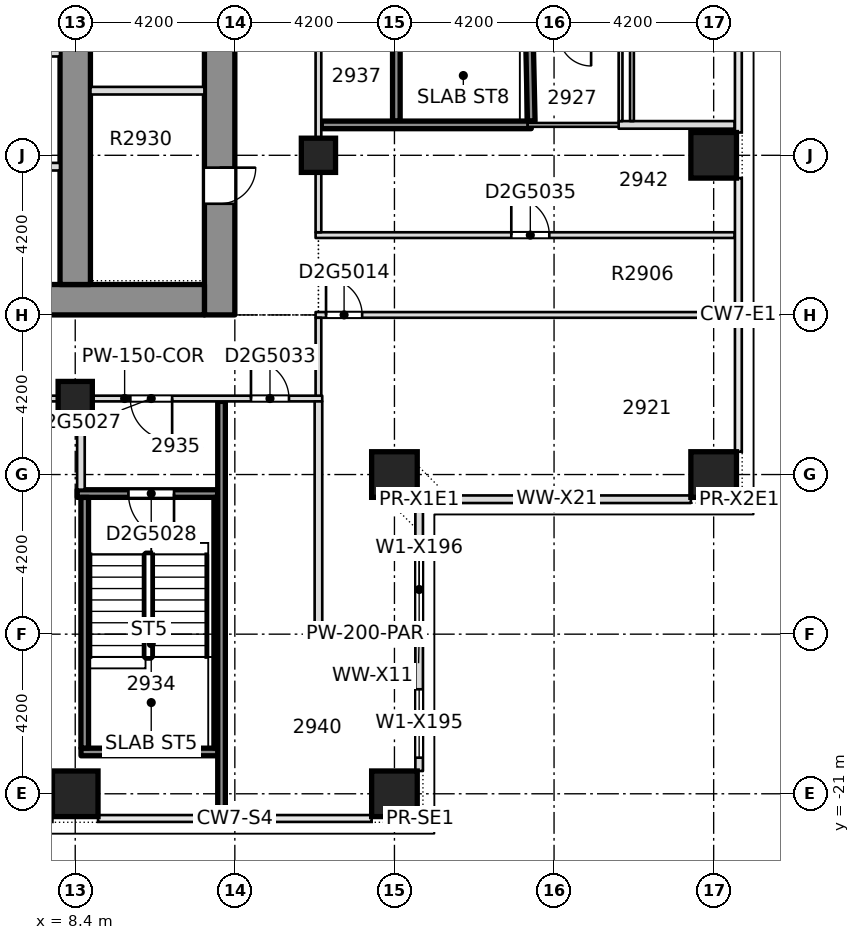
"""IFC4 building model, lengths in metres.
Left out: names, types, materials, properties, quantities, classifications, styles, units other than length and angle.
Written with IfcOpenShell. Run it as: python <this file> out.ifc"""

import sys

from ifc_helpers import new_model, si_unit, direction, frame, frame_2d, origin, origin_2d, place, context, subcontext, project, spatial, rectangle, extrude, element, fill, save


model = new_model("IFC4")
c1 = context("Model", 3, precision=1e-05, world=origin(), true_north=direction((0.0, 1.0)))
c2 = subcontext(c1, "Body", "Model", "MODEL_VIEW")
j1 = project(units=[si_unit("LENGTHUNIT", "METRE"), si_unit("PLANEANGLEUNIT", "RADIAN")], contexts=[c1])
p1 = place(None, origin())
s1 = spatial("IfcSite", under=j1, at=p1, CompositionType="ELEMENT")
p2 = place(p1, origin())
s2 = spatial("IfcBuilding", under=s1, at=p2, CompositionType="ELEMENT")
p3 = place(p2, frame((0.0, 0.0, 114.9)))
s3 = spatial("IfcBuildingStorey", under=s2, at=p3, CompositionType="ELEMENT", Elevation=114.9)
p4 = place(p3, frame((12.2, -8.4, -0.32), z_axis=(0.0, 0.0, 1.0), x_axis=(0.0, 1.0, 0.0)))
e1 = element("IfcWall", 1, at=p4, inside=s3, PredefinedType="SHEAR", context=c2, shape_type="SweptSolid", body=[
    extrude(rectangle(XDim=30.15, YDim=0.8, at=frame_2d((15.075, 0.0))), origin(), (0.0, 0.0, 1.0), 3.45),
])
p5 = place(p4, frame((2.925, 0.0, 0.32)))
e2 = element("IfcOpeningElement", 2, at=p5, cuts=e1, PredefinedType="OPENING", context=c2, shape_type="SweptSolid", body=[
    extrude(rectangle(XDim=0.95, YDim=2.1, at=frame_2d((0.475, 1.05))), frame((0.0, 0.41, 0.0), z_axis=(0.0, -1.0, 0.0), x_axis=(1.0, 0.0, 0.0)), (0.0, 0.0, 1.0), 0.82),
])
p6 = place(p4, frame((7.025, 0.0, 0.32)))
e3 = element("IfcOpeningElement", 3, at=p6, cuts=e1, PredefinedType="OPENING", context=c2, shape_type="SweptSolid", body=[
    extrude(rectangle(XDim=0.95, YDim=2.1, at=frame_2d((0.475, 1.05))), frame((0.0, 0.41, 0.0), z_axis=(0.0, -1.0, 0.0), x_axis=(1.0, 0.0, 0.0)), (0.0, 0.0, 1.0), 0.82),
])
p7 = place(p4, frame((10.875, 0.0, 0.32)))
e4 = element("IfcOpeningElement", 4, at=p7, cuts=e1, PredefinedType="OPENING", context=c2, shape_type="SweptSolid", body=[
    extrude(rectangle(XDim=0.95, YDim=2.1, at=frame_2d((0.475, 1.05))), frame((0.0, 0.41, 0.0), z_axis=(0.0, -1.0, 0.0), x_axis=(1.0, 0.0, 0.0)), (0.0, 0.0, 1.0), 0.82),
])
p8 = place(p4, frame((15.625, 0.0, 0.32)))
e5 = element("IfcOpeningElement", 5, at=p8, cuts=e1, PredefinedType="OPENING", context=c2, shape_type="SweptSolid", body=[
    extrude(rectangle(XDim=0.95, YDim=2.1, at=frame_2d((0.475, 1.05))), frame((0.0, 0.41, 0.0), z_axis=(0.0, -1.0, 0.0), x_axis=(1.0, 0.0, 0.0)), (0.0, 0.0, 1.0), 0.82),
])
p9 = place(p4, frame((24.75, 0.0, 0.32)))
e6 = element("IfcOpeningElement", 6, at=p9, cuts=e1, PredefinedType="OPENING", context=c2, shape_type="SweptSolid", body=[
    extrude(rectangle(XDim=0.95, YDim=2.1, at=frame_2d((0.475, 1.05))), frame((0.0, 0.41, 0.0), z_axis=(0.0, -1.0, 0.0), x_axis=(1.0, 0.0, 0.0)), (0.0, 0.0, 1.0), 0.82),
])
p10 = place(p4, frame((19.3, 0.0, 0.32)))
e7 = element("IfcOpeningElement", 7, at=p10, cuts=e1, PredefinedType="OPENING", context=c2, shape_type="SweptSolid", body=[
    extrude(rectangle(XDim=1.2, YDim=2.1, at=frame_2d((0.6, 1.05))), frame((0.0, 0.41, 0.0), z_axis=(0.0, -1.0, 0.0), x_axis=(1.0, 0.0, 0.0)), (0.0, 0.0, 1.0), 0.82),
])
p11 = place(p3, frame((-11.8, -8.0, -0.32), z_axis=(0.0, 0.0, 1.0), x_axis=(1.0, 0.0, 0.0)))
e8 = element("IfcWall", 8, at=p11, inside=s3, PredefinedType="SHEAR", context=c2, shape_type="SweptSolid", body=[
    extrude(rectangle(XDim=23.6, YDim=0.8, at=frame_2d((11.8, 0.0))), origin(), (0.0, 0.0, 1.0), 3.45),
])
p12 = place(p11, frame((7.05, 0.0, 0.32)))
e9 = element("IfcOpeningElement", 9, at=p12, cuts=e8, PredefinedType="OPENING", context=c2, shape_type="SweptSolid", body=[
    extrude(rectangle(XDim=1.8, YDim=2.1, at=frame_2d((0.9, 1.05))), frame((0.0, 0.41, 0.0), z_axis=(0.0, -1.0, 0.0), x_axis=(1.0, 0.0, 0.0)), (0.0, 0.0, 1.0), 0.82),
])
p13 = place(p11, frame((14.75, 0.0, 0.32)))
e10 = element("IfcOpeningElement", 10, at=p13, cuts=e8, PredefinedType="OPENING", context=c2, shape_type="SweptSolid", body=[
    extrude(rectangle(XDim=1.8, YDim=2.1, at=frame_2d((0.9, 1.05))), frame((0.0, 0.41, 0.0), z_axis=(0.0, -1.0, 0.0), x_axis=(1.0, 0.0, 0.0)), (0.0, 0.0, 1.0), 0.82),
])
p14 = place(p3, frame((8.4, -7.6, -0.32), z_axis=(0.0, 0.0, 1.0), x_axis=(0.0, 1.0, 0.0)))
e11 = element("IfcWall", 11, at=p14, inside=s3, PredefinedType="SHEAR", context=c2, shape_type="SweptSolid", body=[
    extrude(rectangle(XDim=28.55, YDim=0.8, at=frame_2d((14.275, 0.0))), origin(), (0.0, 0.0, 1.0), 3.45),
])
p15 = place(p14, frame((18.5, 0.0, 0.32)))
e12 = element("IfcOpeningElement", 12, at=p15, cuts=e11, PredefinedType="OPENING", context=c2, shape_type="SweptSolid", body=[
    extrude(rectangle(XDim=1.2, YDim=2.1, at=frame_2d((0.6, 1.05))), frame((0.0, 0.41, 0.0), z_axis=(0.0, -1.0, 0.0), x_axis=(1.0, 0.0, 0.0)), (0.0, 0.0, 1.0), 0.82),
])
for number, where, z_axis, x_axis in (
    (13, (8.4, -21.0, -0.32), (0.0, 0.0, 1.0), (1.0, 0.0, 0.0)),
    (14, (16.8, -21.0, -0.32), (0.0, 0.0, 1.0), (1.0, 0.0, 0.0)),
    (15, (16.8, -12.6, -0.32), (0.0, 0.0, 1.0), (1.0, 0.0, 0.0)),
    (16, (25.2, -12.6, -0.32), (0.0, 0.0, 1.0), (1.0, 0.0, 0.0)),
    (17, (25.2, -4.2, -0.32), (0.0, 0.0, 1.0), (1.0, 0.0, 0.0)),
):
    element("IfcColumn", number, at=place(p3, frame(where, z_axis=z_axis, x_axis=x_axis)), inside=s3, PredefinedType="COLUMN", context=c2, shape_type="SweptSolid", body=[
        extrude(rectangle(XDim=1.2, YDim=1.2, at=origin_2d()), origin(), (0.0, 0.0, 1.0), 3.45),
    ])
for number, where, z_axis, x_axis in (
    (18, (8.4, -10.6, -0.32), (0.0, 0.0, 1.0), (1.0, 0.0, 0.0)),
    (19, (14.8, -4.2, -0.32), (0.0, 0.0, 1.0), (1.0, 0.0, 0.0)),
):
    element("IfcColumn", number, at=place(p3, frame(where, z_axis=z_axis, x_axis=x_axis)), inside=s3, PredefinedType="COLUMN", context=c2, shape_type="SweptSolid", body=[
        extrude(rectangle(XDim=0.9, YDim=0.9, at=origin_2d()), origin(), (0.0, 0.0, 1.0), 3.45),
    ])
p16 = place(p3, frame((8.552, -19.9, 0.0), z_axis=(0.0, 0.0, 1.0), x_axis=(1.0, 0.0, 0.0)))
e20 = element("IfcWall", 20, at=p16, inside=s3, PredefinedType="SOLIDWALL", context=c2, shape_type="SweptSolid", body=[
    extrude(rectangle(XDim=3.696, YDim=0.2, at=frame_2d((1.848, 0.0))), origin(), (0.0, 0.0, 1.0), 3.13),
])
p17 = place(p3, frame((14.702, -16.8, 0.0), z_axis=(0.0, 0.0, 1.0), x_axis=(1.0, 0.0, 0.0)))
e21 = element("IfcWall", 21, at=p17, inside=s3, PredefinedType="PARTITIONING", context=c2, shape_type="SweptSolid", body=[
    extrude(rectangle(XDim=2.648, YDim=0.2, at=frame_2d((1.324, 0.0))), origin(), (0.0, 0.0, 1.0), 3.13),
])
p18 = place(p3, frame((8.452, -13.1, 0.0), z_axis=(0.0, 0.0, 1.0), x_axis=(1.0, 0.0, 0.0)))
e22 = element("IfcWall", 22, at=p18, inside=s3, PredefinedType="SOLIDWALL", context=c2, shape_type="SweptSolid", body=[
    extrude(rectangle(XDim=3.696, YDim=0.2, at=frame_2d((1.848, 0.0))), origin(), (0.0, 0.0, 1.0), 3.13),
])
p19 = place(p18, frame((1.348, 0.0, 0.0)))
e23 = element("IfcOpeningElement", 23, at=p19, cuts=e22, PredefinedType="OPENING", context=c2, shape_type="SweptSolid", body=[
    extrude(rectangle(XDim=1.2, YDim=2.1, at=frame_2d((0.6, 1.05))), frame((0.0, 0.11, 0.0), z_axis=(0.0, -1.0, 0.0), x_axis=(1.0, 0.0, 0.0)), (0.0, 0.0, 1.0), 0.22),
])
p20 = place(p3, frame((4.5, -10.6, 0.0), z_axis=(0.0, 0.0, 1.0), x_axis=(1.0, 0.0, 0.0)))
e24 = element("IfcWall", 24, at=p20, inside=s3, PredefinedType="PARTITIONING", context=c2, shape_type="SweptSolid", body=[
    extrude(rectangle(XDim=10.4, YDim=0.15, at=frame_2d((5.2, 0.0))), origin(), (0.0, 0.0, 1.0), 3.13),
])
p21 = place(p20, frame((1.575, 0.0, 0.0)))
e25 = element("IfcOpeningElement", 25, at=p21, cuts=e24, PredefinedType="OPENING", context=c2, shape_type="SweptSolid", body=[
    extrude(rectangle(XDim=0.95, YDim=2.1, at=frame_2d((0.475, 1.05))), frame((0.0, 0.085, 0.0), z_axis=(0.0, -1.0, 0.0), x_axis=(1.0, 0.0, 0.0)), (0.0, 0.0, 1.0), 0.17),
])
p22 = place(p20, frame((5.35, 0.0, 0.0)))
e26 = element("IfcOpeningElement", 26, at=p22, cuts=e24, PredefinedType="OPENING", context=c2, shape_type="SweptSolid", body=[
    extrude(rectangle(XDim=1.1, YDim=2.1, at=frame_2d((0.55, 1.05))), frame((0.0, 0.085, 0.0), z_axis=(0.0, -1.0, 0.0), x_axis=(1.0, 0.0, 0.0)), (0.0, 0.0, 1.0), 0.17),
])
p23 = place(p20, frame((8.525, 0.0, 0.0)))
e27 = element("IfcOpeningElement", 27, at=p23, cuts=e24, PredefinedType="OPENING", context=c2, shape_type="SweptSolid", body=[
    extrude(rectangle(XDim=1.0, YDim=2.1, at=frame_2d((0.5, 1.05))), frame((0.0, 0.085, 0.0), z_axis=(0.0, -1.0, 0.0), x_axis=(1.0, 0.0, 0.0)), (0.0, 0.0, 1.0), 0.17),
])
p24 = place(p3, frame((14.725, -8.4, 0.0), z_axis=(0.0, 0.0, 1.0), x_axis=(1.0, 0.0, 0.0)))
e28 = element("IfcWall", 28, at=p24, inside=s3, PredefinedType="PARTITIONING", context=c2, shape_type="SweptSolid", body=[
    extrude(rectangle(XDim=11.025, YDim=0.15, at=frame_2d((5.512, 0.0))), origin(), (0.0, 0.0, 1.0), 3.13),
])
p25 = place(p24, frame((0.275, 0.0, 0.0)))
e29 = element("IfcOpeningElement", 29, at=p25, cuts=e28, PredefinedType="OPENING", context=c2, shape_type="SweptSolid", body=[
    extrude(rectangle(XDim=0.95, YDim=2.1, at=frame_2d((0.475, 1.05))), frame((0.0, 0.085, 0.0), z_axis=(0.0, -1.0, 0.0), x_axis=(1.0, 0.0, 0.0)), (0.0, 0.0, 1.0), 0.17),
])
p26 = place(p3, frame((14.725, -6.3, 0.0), z_axis=(0.0, 0.0, 1.0), x_axis=(1.0, 0.0, 0.0)))
e30 = element("IfcWall", 30, at=p26, inside=s3, PredefinedType="PARTITIONING", context=c2, shape_type="SweptSolid", body=[
    extrude(rectangle(XDim=11.025, YDim=0.15, at=frame_2d((5.512, 0.0))), origin(), (0.0, 0.0, 1.0), 3.13),
])
p27 = place(p26, frame((5.15, 0.0, 0.0)))
e31 = element("IfcOpeningElement", 31, at=p27, cuts=e30, PredefinedType="OPENING", context=c2, shape_type="SweptSolid", body=[
    extrude(rectangle(XDim=1.0, YDim=2.1, at=frame_2d((0.5, 1.05))), frame((0.0, 0.085, 0.0), z_axis=(0.0, -1.0, 0.0), x_axis=(1.0, 0.0, 0.0)), (0.0, 0.0, 1.0), 0.17),
])
p28 = place(p3, frame((20.3, -3.4, 0.0), z_axis=(0.0, 0.0, 1.0), x_axis=(1.0, 0.0, 0.0)))
e32 = element("IfcWall", 32, at=p28, inside=s3, PredefinedType="PARTITIONING", context=c2, shape_type="SweptSolid", body=[
    extrude(rectangle(XDim=2.5, YDim=0.1, at=frame_2d((1.25, 0.0))), origin(), (0.0, 0.0, 1.0), 3.13),
])
p29 = place(p3, frame((22.7, -3.4, 0.0), z_axis=(0.0, 0.0, 1.0), x_axis=(1.0, 0.0, 0.0)))
e33 = element("IfcWall", 33, at=p29, inside=s3, PredefinedType="PARTITIONING", context=c2, shape_type="SweptSolid", body=[
    extrude(rectangle(XDim=3.05, YDim=0.2, at=frame_2d((1.525, 0.0))), origin(), (0.0, 0.0, 1.0), 3.13),
])
p30 = place(p3, frame((8.55, -12.998, 0.0), z_axis=(0.0, 0.0, 1.0), x_axis=(0.0, 1.0, 0.0)))
e34 = element("IfcWall", 34, at=p30, inside=s3, PredefinedType="PARTITIONING", context=c2, shape_type="SweptSolid", body=[
    extrude(rectangle(XDim=2.323, YDim=0.2, at=frame_2d((1.162, 0.0))), origin(), (0.0, 0.0, 1.0), 3.13),
])
for number, where, z_axis, x_axis in (
    (35, (8.65, -19.798, 0.0), (0.0, 0.0, 1.0), (0.0, 1.0, 0.0)),
    (36, (12.15, -19.798, 0.0), (0.0, 0.0, 1.0), (0.0, 1.0, 0.0)),
):
    element("IfcWall", number, at=place(p3, frame(where, z_axis=z_axis, x_axis=x_axis)), inside=s3, PredefinedType="SOLIDWALL", context=c2, shape_type="SweptSolid", body=[
        extrude(rectangle(XDim=6.596, YDim=0.2, at=frame_2d((3.298, 0.0))), origin(), (0.0, 0.0, 1.0), 3.13),
    ])
p31 = place(p3, frame((14.8, -16.698, 0.0), z_axis=(0.0, 0.0, 1.0), x_axis=(0.0, 1.0, 0.0)))
e37 = element("IfcWall", 37, at=p31, inside=s3, PredefinedType="PARTITIONING", context=c2, shape_type="SweptSolid", body=[
    extrude(rectangle(XDim=6.023, YDim=0.2, at=frame_2d((3.011, 0.0))), origin(), (0.0, 0.0, 1.0), 3.13),
])
p32 = place(p3, frame((14.8, -10.525, 0.0), z_axis=(0.0, 0.0, 1.0), x_axis=(0.0, 1.0, 0.0)))
e38 = element("IfcWall", 38, at=p32, inside=s3, PredefinedType="PARTITIONING", context=c2, shape_type="SweptSolid", body=[
    extrude(rectangle(XDim=2.05, YDim=0.15, at=frame_2d((1.025, 0.0))), origin(), (0.0, 0.0, 1.0), 3.13),
])
p33 = place(p3, frame((14.8, -6.225, 0.0), z_axis=(0.0, 0.0, 1.0), x_axis=(0.0, 1.0, 0.0)))
e39 = element("IfcWall", 39, at=p33, inside=s3, PredefinedType="PARTITIONING", context=c2, shape_type="SweptSolid", body=[
    extrude(rectangle(XDim=18.75, YDim=0.15, at=frame_2d((9.375, 0.0))), origin(), (0.0, 0.0, 1.0), 3.13),
])
p34 = place(p33, frame((13.725, 0.0, 0.0)))
e40 = element("IfcOpeningElement", 40, at=p34, cuts=e39, PredefinedType="OPENING", context=c2, shape_type="SweptSolid", body=[
    extrude(rectangle(XDim=1.0, YDim=2.1, at=frame_2d((0.5, 1.05))), frame((0.0, 0.085, 0.0), z_axis=(0.0, -1.0, 0.0), x_axis=(1.0, 0.0, 0.0)), (0.0, 0.0, 1.0), 0.17),
])
p35 = place(p33, frame((5.675, 0.0, 0.0)))
e41 = element("IfcOpeningElement", 41, at=p35, cuts=e39, PredefinedType="OPENING", context=c2, shape_type="SweptSolid", body=[
    extrude(rectangle(XDim=1.1, YDim=2.1, at=frame_2d((0.55, 1.05))), frame((0.0, 0.085, 0.0), z_axis=(0.0, -1.0, 0.0), x_axis=(1.0, 0.0, 0.0)), (0.0, 0.0, 1.0), 0.17),
])
p36 = place(p3, frame((16.85, -3.3, 0.0), z_axis=(0.0, 0.0, 1.0), x_axis=(0.0, 1.0, 0.0)))
e42 = element("IfcWall", 42, at=p36, inside=s3, PredefinedType="SOLIDWALL", context=c2, shape_type="SweptSolid", body=[
    extrude(rectangle(XDim=6.6, YDim=0.2, at=frame_2d((3.3, 0.0))), origin(), (0.0, 0.0, 1.0), 3.13),
])
p37 = place(p36, frame((5.1, 0.0, 0.0)))
e43 = element("IfcOpeningElement", 43, at=p37, cuts=e42, PredefinedType="OPENING", context=c2, shape_type="SweptSolid", body=[
    extrude(rectangle(XDim=1.2, YDim=2.1, at=frame_2d((0.6, 1.05))), frame((0.0, 0.11, 0.0), z_axis=(0.0, -1.0, 0.0), x_axis=(1.0, 0.0, 0.0)), (0.0, 0.0, 1.0), 0.22),
])
p38 = place(p3, frame((20.4, -3.3, 0.0), z_axis=(0.0, 0.0, 1.0), x_axis=(-0.021771342749, 0.999762976227, 0.0)))
e44 = element("IfcWall", 44, at=p38, inside=s3, PredefinedType="SOLIDWALL", context=c2, shape_type="SweptSolid", body=[
    extrude(rectangle(XDim=2.131, YDim=0.2, at=frame_2d((1.065, 0.0))), origin(), (0.0, 0.0, 1.0), 3.13),
])
p39 = place(p3, frame((22.75, -3.3, 0.0), z_axis=(0.0, 0.0, 1.0), x_axis=(0.0, 1.0, 0.0)))
e45 = element("IfcWall", 45, at=p39, inside=s3, PredefinedType="PARTITIONING", context=c2, shape_type="SweptSolid", body=[
    extrude(rectangle(XDim=2.25, YDim=0.1, at=frame_2d((1.125, 0.0))), origin(), (0.0, 0.0, 1.0), 3.13),
])
p40 = place(p3, frame((23.05, -3.3, 0.0), z_axis=(0.0, 0.0, 1.0), x_axis=(0.0, 1.0, 0.0)))
e46 = element("IfcWall", 46, at=p40, inside=s3, PredefinedType="PARTITIONING", context=c2, shape_type="SweptSolid", body=[
    extrude(rectangle(XDim=6.65, YDim=0.1, at=frame_2d((3.325, 0.0))), origin(), (0.0, 0.0, 1.0), 3.13),
])
p41 = place(p3, frame((17.45, -20.4, 0.0), z_axis=(0.0, 0.0, 1.0), x_axis=(0.0, 1.0, 0.0)))
e47 = element("IfcWall", 47, at=p41, inside=s3, PredefinedType="STANDARD", context=c2, shape_type="SweptSolid", body=[
    extrude(rectangle(XDim=7.05, YDim=0.2, at=frame_2d((3.525, 0.0))), origin(), (0.0, 0.0, 1.0), 3.13),
])
p42 = place(p41, frame((0.35, 0.0, 0.2)))
e48 = element("IfcOpeningElement", 48, at=p42, cuts=e47, PredefinedType="OPENING", context=c2, shape_type="SweptSolid", body=[
    extrude(rectangle(XDim=1.8, YDim=2.65, at=frame_2d((0.9, 1.325))), frame((0.0, 0.11, 0.0), z_axis=(0.0, -1.0, 0.0), x_axis=(1.0, 0.0, 0.0)), (0.0, 0.0, 1.0), 0.22),
])
p43 = place(p41, frame((3.875, 0.0, 0.2)))
e49 = element("IfcOpeningElement", 49, at=p43, cuts=e47, PredefinedType="OPENING", context=c2, shape_type="SweptSolid", body=[
    extrude(rectangle(XDim=1.8, YDim=2.65, at=frame_2d((0.9, 1.325))), frame((0.0, 0.11, 0.0), z_axis=(0.0, -1.0, 0.0), x_axis=(1.0, 0.0, 0.0)), (0.0, 0.0, 1.0), 0.22),
])
p44 = place(p3, frame((17.55, -13.25, 0.0), z_axis=(0.0, 0.0, 1.0), x_axis=(1.0, 0.0, 0.0)))
e50 = element("IfcWall", 50, at=p44, inside=s3, PredefinedType="STANDARD", context=c2, shape_type="SweptSolid", body=[
    extrude(rectangle(XDim=7.05, YDim=0.2, at=frame_2d((3.525, 0.0))), origin(), (0.0, 0.0, 1.0), 3.13),
])
for number, where, z_axis, x_axis in (
    (51, (5.575, -4.5, 0.0), (0.0, 0.0, 1.0), (1.0, 0.0, 0.0)),
    (52, (5.575, -1.5, 0.0), (0.0, 0.0, 1.0), (1.0, 0.0, 0.0)),
):
    element("IfcWall", number, at=place(p3, frame(where, z_axis=z_axis, x_axis=x_axis)), inside=s3, PredefinedType="PARTITIONING", context=c2, shape_type="SweptSolid", body=[
        extrude(rectangle(XDim=2.424, YDim=0.2, at=frame_2d((1.212, 0.0))), origin(), (0.0, 0.0, 1.0), 3.13),
    ])
p45 = place(p3, frame((8.801, -2.5, 0.0), z_axis=(0.0, 0.0, 1.0), x_axis=(1.0, 0.0, 0.0)))
e53 = element("IfcWall", 53, at=p45, inside=s3, PredefinedType="PARTITIONING", context=c2, shape_type="SweptSolid", body=[
    extrude(rectangle(XDim=2.998, YDim=0.2, at=frame_2d((1.499, 0.0))), origin(), (0.0, 0.0, 1.0), 3.13),
])
p46 = place(p3, frame((12.25, -21.55, 0.0), z_axis=(0.0, 0.0, 1.0), x_axis=(0.0, 1.0, 0.0)))
e54 = element("IfcWall", 54, at=p46, inside=s3, PredefinedType="SOLIDWALL", context=c2, shape_type="SweptSolid", body=[
    extrude(rectangle(XDim=10.875, YDim=0.2, at=frame_2d((5.438, 0.0))), origin(), (0.0, 0.0, 1.0), 3.13),
])
p47 = place(p3, frame((14.875, -3.4, 0.0), z_axis=(0.0, 0.0, 1.0), x_axis=(1.0, 0.0, 0.0)))
e55 = element("IfcWall", 55, at=p47, inside=s3, PredefinedType="SOLIDWALL", context=c2, shape_type="SweptSolid", body=[
    extrude(rectangle(XDim=5.525, YDim=0.2, at=frame_2d((2.762, 0.0))), origin(), (0.0, 0.0, 1.0), 3.13),
])
p48 = place(p25, origin())
e56 = element("IfcDoor", 56, at=p48, inside=s3, OperationType="SINGLE_SWING_RIGHT", PredefinedType="DOOR", context=c2, shape_type="SweptSolid", body=[
    extrude(rectangle(XDim=0.95, YDim=2.1, at=frame_2d((0.475, 1.05))), frame((0.0, 0.025, 0.0), z_axis=(0.0, -1.0, 0.0), x_axis=(1.0, 0.0, 0.0)), (0.0, 0.0, 1.0), 0.05),
])
fill(e29, e56)
p49 = place(p22, origin())
e57 = element("IfcDoor", 57, at=p49, inside=s3, OperationType="SINGLE_SWING_LEFT", PredefinedType="DOOR", context=c2, shape_type="SweptSolid", body=[
    extrude(rectangle(XDim=1.1, YDim=2.1, at=frame_2d((0.55, 1.05))), frame((0.0, 0.025, 0.0), z_axis=(0.0, -1.0, 0.0), x_axis=(1.0, 0.0, 0.0)), (0.0, 0.0, 1.0), 0.05),
])
fill(e26, e57)
p50 = place(p19, origin())
e58 = element("IfcDoor", 58, at=p50, inside=s3, OperationType="SINGLE_SWING_RIGHT", PredefinedType="DOOR", context=c2, shape_type="SweptSolid", body=[
    extrude(rectangle(XDim=1.2, YDim=2.1, at=frame_2d((0.6, 1.05))), frame((0.0, 0.025, 0.0), z_axis=(0.0, -1.0, 0.0), x_axis=(1.0, 0.0, 0.0)), (0.0, 0.0, 1.0), 0.05),
])
fill(e23, e58)
p51 = place(p23, origin())
e59 = element("IfcDoor", 59, at=p51, inside=s3, OperationType="SINGLE_SWING_LEFT", PredefinedType="DOOR", context=c2, shape_type="SweptSolid", body=[
    extrude(rectangle(XDim=1.0, YDim=2.1, at=frame_2d((0.5, 1.05))), frame((0.0, 0.025, 0.0), z_axis=(0.0, -1.0, 0.0), x_axis=(1.0, 0.0, 0.0)), (0.0, 0.0, 1.0), 0.05),
])
fill(e27, e59)
p52 = place(p27, origin())
e60 = element("IfcDoor", 60, at=p52, inside=s3, OperationType="SINGLE_SWING_RIGHT", PredefinedType="DOOR", context=c2, shape_type="SweptSolid", body=[
    extrude(rectangle(XDim=1.0, YDim=2.1, at=frame_2d((0.5, 1.05))), frame((0.0, 0.025, 0.0), z_axis=(0.0, -1.0, 0.0), x_axis=(1.0, 0.0, 0.0)), (0.0, 0.0, 1.0), 0.05),
])
fill(e31, e60)
p53 = place(p42, origin())
e61 = element("IfcWindow", 61, at=p53, inside=s3, PartitioningType="SINGLE_PANEL", PredefinedType="WINDOW", context=c2, shape_type="SweptSolid", body=[
    extrude(rectangle(XDim=1.8, YDim=2.65, at=frame_2d((0.9, 1.325))), frame((0.0, 0.03, 0.0), z_axis=(0.0, -1.0, 0.0), x_axis=(1.0, 0.0, 0.0)), (0.0, 0.0, 1.0), 0.06),
])
fill(e48, e61)
p54 = place(p43, origin())
e62 = element("IfcWindow", 62, at=p54, inside=s3, PartitioningType="SINGLE_PANEL", PredefinedType="WINDOW", context=c2, shape_type="SweptSolid", body=[
    extrude(rectangle(XDim=1.8, YDim=2.65, at=frame_2d((0.9, 1.325))), frame((0.0, 0.03, 0.0), z_axis=(0.0, -1.0, 0.0), x_axis=(1.0, 0.0, 0.0)), (0.0, 0.0, 1.0), 0.06),
])
fill(e49, e62)
p55 = place(p5, origin())
e63 = element("IfcDoor", 63, at=p55, inside=s3, OperationType="SINGLE_SWING_LEFT", PredefinedType="DOOR", context=c2, shape_type="SweptSolid", body=[
    extrude(rectangle(XDim=0.95, YDim=2.1, at=frame_2d((0.475, 1.05))), frame((0.0, 0.025, 0.0), z_axis=(0.0, -1.0, 0.0), x_axis=(1.0, 0.0, 0.0)), (0.0, 0.0, 1.0), 0.05),
])
fill(e2, e63)
save(model, sys.argv[1])
